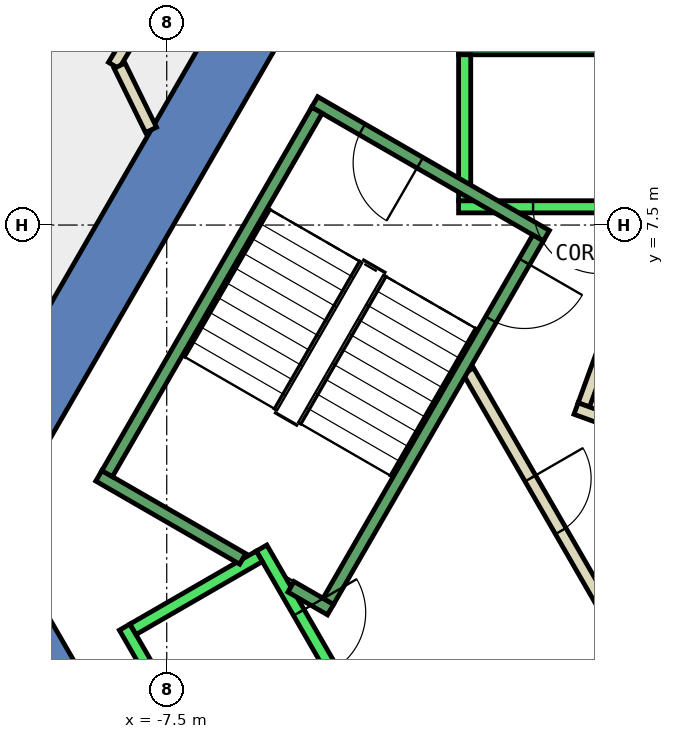
"""IFC4 building model, lengths in metres.
Left out: names, types, materials, properties, quantities, classifications, styles, units other than length and angle.
Written with IfcOpenShell. Run it as: python <this file> out.ifc"""

import sys

from ifc_helpers import new_model, si_unit, direction, frame, frame_2d, origin, place, context, subcontext, project, spatial, polyline, rectangle, outline, extrude, element, fill, save


model = new_model("IFC4")
c1 = context("Model", 3, precision=1e-05, world=origin(), true_north=direction((0.0, 1.0)))
c2 = subcontext(c1, "Body", "Model", "MODEL_VIEW")
j1 = project(units=[si_unit("LENGTHUNIT", "METRE"), si_unit("PLANEANGLEUNIT", "RADIAN")], contexts=[c1])
p1 = place(None, origin())
s1 = spatial("IfcSite", under=j1, at=p1, CompositionType="ELEMENT")
p2 = place(p1, origin())
s2 = spatial("IfcBuilding", under=s1, at=p2, CompositionType="ELEMENT")
p3 = place(p2, frame((0.0, 0.0, 273.8)))
s3 = spatial("IfcBuildingStorey", under=s2, at=p3, CompositionType="ELEMENT", Elevation=273.8)
p4 = place(p3, frame((0.0, 0.0, -0.34)))
e1 = element("IfcWall", 1, at=p4, inside=s3, PredefinedType="SHEAR", context=c2, shape_type="SweptSolid", body=[
    extrude(outline(polyline([(-10.535, 4.253), (-9.583, 3.703), (-5.138, 11.4), (-5.774, 12.5), (-10.535, 4.253)])), origin(), (0.0, 0.0, 1.0), 3.6),
])
p5 = place(p3, frame((0.0, 0.0, -0.34)))
e2 = element("IfcWall", 2, at=p5, inside=s3, PredefinedType="SHEAR", context=c2, shape_type="SweptSolid", body=[
    extrude(outline(polyline([(-11.547, 2.5), (-5.774, -7.5), (-5.138, -6.4), (-10.277, 2.5), (-11.547, 2.5)])), origin(), (0.0, 0.0, 1.0), 3.6),
])
p6 = place(p3, frame((0.181, 6.797, 0.0), z_axis=(0.0, 0.0, 1.0), x_axis=(-0.342020767299, -0.939692393678, 0.0)))
e3 = element("IfcWall", 3, at=p6, inside=s3, PredefinedType="PARTITIONING", context=c2, shape_type="SweptSolid", body=[
    extrude(rectangle(XDim=2.4, YDim=0.2, at=frame_2d((1.2, 0.0))), origin(), (0.0, 0.0, 1.0), 3.26),
])
p7 = place(p3, frame((-0.768, 4.482, 0.0), z_axis=(0.0, 0.0, 1.0), x_axis=(0.939664280748, -0.342097996905, 0.0)))
e4 = element("IfcWall", 4, at=p7, inside=s3, PredefinedType="PARTITIONING", context=c2, shape_type="SweptSolid", body=[
    extrude(rectangle(XDim=2.595, YDim=0.2, at=frame_2d((1.298, 0.0))), origin(), (0.0, 0.0, 1.0), 3.26),
])
p8 = place(p7, frame((0.848, 0.0, 0.0)))
e5 = element("IfcOpeningElement", 5, at=p8, cuts=e4, PredefinedType="OPENING", context=c2, shape_type="SweptSolid", body=[
    extrude(rectangle(XDim=0.9, YDim=2.1, at=frame_2d((0.45, 1.05))), frame((0.0, 0.11, 0.0), z_axis=(0.0, -1.0, 0.0), x_axis=(1.0, 0.0, 0.0)), (0.0, 0.0, 1.0), 0.22),
])
p9 = place(p3, frame((-5.885, 14.264, 0.0), z_axis=(0.0, 0.0, 1.0), x_axis=(-0.514971458129, -0.857207324579, 0.0)))
e6 = element("IfcWall", 6, at=p9, inside=s3, PredefinedType="PARTITIONING", context=c2, shape_type="SweptSolid", body=[
    extrude(rectangle(XDim=4.83, YDim=0.2, at=frame_2d((2.415, 0.0))), origin(), (0.0, 0.0, 1.0), 3.26),
])
p10 = place(p9, frame((1.915, 0.0, 0.0)))
e7 = element("IfcOpeningElement", 7, at=p10, cuts=e6, PredefinedType="OPENING", context=c2, shape_type="SweptSolid", body=[
    extrude(rectangle(XDim=1.0, YDim=2.1, at=frame_2d((0.5, 1.05))), frame((0.0, 0.11, 0.0), z_axis=(0.0, -1.0, 0.0), x_axis=(1.0, 0.0, 0.0)), (0.0, 0.0, 1.0), 0.22),
])
p11 = place(p3, frame((-8.276, 10.12, 0.0), z_axis=(0.0, 0.0, 1.0), x_axis=(0.440226122236, -0.897886942382, 0.0)))
e8 = element("IfcWall", 8, at=p11, inside=s3, PredefinedType="PARTITIONING", context=c2, shape_type="SweptSolid", body=[
    extrude(rectangle(XDim=1.176, YDim=0.2, at=frame_2d((0.588, 0.0))), origin(), (0.0, 0.0, 1.0), 3.26),
])
p12 = place(p3, frame((-10.789, 9.985, 0.0), z_axis=(0.0, 0.0, 1.0), x_axis=(0.51487988517, 0.857262330823, 0.0)))
e9 = element("IfcWall", 9, at=p12, inside=s3, PredefinedType="PARTITIONING", context=c2, shape_type="SweptSolid", body=[
    extrude(rectangle(XDim=3.177, YDim=0.2, at=frame_2d((1.589, 0.0))), origin(), (0.0, 0.0, 1.0), 3.26),
])
p13 = place(p12, frame((1.089, 0.0, 0.0)))
e10 = element("IfcOpeningElement", 10, at=p13, cuts=e9, PredefinedType="OPENING", context=c2, shape_type="SweptSolid", body=[
    extrude(rectangle(XDim=1.0, YDim=2.1, at=frame_2d((0.5, 1.05))), frame((0.0, 0.11, 0.0), z_axis=(0.0, -1.0, 0.0), x_axis=(1.0, 0.0, 0.0)), (0.0, 0.0, 1.0), 0.22),
])
p14 = place(p3, frame((-0.982, -1.0, 0.0), z_axis=(0.0, 0.0, 1.0), x_axis=(0.50024047865, 0.865886518847, 0.0)))
e11 = element("IfcWall", 11, at=p14, inside=s3, PredefinedType="PARTITIONING", context=c2, shape_type="SweptSolid", body=[
    extrude(rectangle(XDim=1.863, YDim=0.2, at=frame_2d((0.931, 0.0))), origin(), (0.0, 0.0, 1.0), 3.26),
])
p15 = place(p3, frame((-2.54, 5.1, 0.0), z_axis=(0.0, 0.0, 1.0), x_axis=(0.499925051871, -0.866068670783, 0.0)))
e12 = element("IfcWall", 12, at=p15, inside=s3, PredefinedType="PARTITIONING", context=c2, shape_type="SweptSolid", body=[
    extrude(rectangle(XDim=5.181, YDim=0.2, at=frame_2d((2.59, 0.0))), origin(), (0.0, 0.0, 1.0), 3.26),
])
p16 = place(p15, frame((2.04, 0.0, 0.0)))
e13 = element("IfcOpeningElement", 13, at=p16, cuts=e12, PredefinedType="OPENING", context=c2, shape_type="SweptSolid", body=[
    extrude(rectangle(XDim=1.0, YDim=2.1, at=frame_2d((0.5, 1.05))), frame((0.0, 0.11, 0.0), z_axis=(0.0, -1.0, 0.0), x_axis=(1.0, 0.0, 0.0)), (0.0, 0.0, 1.0), 0.22),
])
p17 = place(p3, frame((2.7, 7.8, 0.0), z_axis=(0.0, 0.0, 1.0), x_axis=(-1.0, 0.0, 0.0)))
e14 = element("IfcWall", 14, at=p17, inside=s3, PredefinedType="STANDARD", context=c2, shape_type="SweptSolid", body=[
    extrude(rectangle(XDim=5.4, YDim=0.2, at=frame_2d((2.7, 0.0))), origin(), (0.0, 0.0, 1.0), 3.26),
])
p18 = place(p17, frame((1.225, 0.0, 0.0)))
e15 = element("IfcOpeningElement", 15, at=p18, cuts=e14, PredefinedType="OPENING", context=c2, shape_type="SweptSolid", body=[
    extrude(rectangle(XDim=1.1, YDim=2.1, at=frame_2d((0.55, 1.05))), frame((0.0, 0.11, 0.0), z_axis=(0.0, -1.0, 0.0), x_axis=(1.0, 0.0, 0.0)), (0.0, 0.0, 1.0), 0.22),
])
p19 = place(p17, frame((3.075, 0.0, 0.0)))
e16 = element("IfcOpeningElement", 16, at=p19, cuts=e14, PredefinedType="OPENING", context=c2, shape_type="SweptSolid", body=[
    extrude(rectangle(XDim=1.1, YDim=2.1, at=frame_2d((0.55, 1.05))), frame((0.0, 0.11, 0.0), z_axis=(0.0, -1.0, 0.0), x_axis=(1.0, 0.0, 0.0)), (0.0, 0.0, 1.0), 0.22),
])
p20 = place(p3, frame((2.7, 10.4, 0.0), z_axis=(0.0, 0.0, 1.0), x_axis=(-1.0, 0.0, 0.0)))
e17 = element("IfcWall", 17, at=p20, inside=s3, PredefinedType="STANDARD", context=c2, shape_type="SweptSolid", body=[
    extrude(rectangle(XDim=5.4, YDim=0.2, at=frame_2d((2.7, 0.0))), origin(), (0.0, 0.0, 1.0), 3.26),
])
p21 = place(p3, frame((-2.6, 7.9, 0.0), z_axis=(0.0, 0.0, 1.0), x_axis=(0.0, 1.0, 0.0)))
e18 = element("IfcWall", 18, at=p21, inside=s3, PredefinedType="STANDARD", context=c2, shape_type="SweptSolid", body=[
    extrude(rectangle(XDim=2.4, YDim=0.2, at=frame_2d((1.2, 0.0))), origin(), (0.0, 0.0, 1.0), 3.26),
])
p22 = place(p3, frame((-5.94, 2.188, 0.0), z_axis=(0.0, 0.0, 1.0), x_axis=(0.500034260056, -0.866005622828, 0.0)))
e19 = element("IfcWall", 19, at=p22, inside=s3, PredefinedType="STANDARD", context=c2, shape_type="SweptSolid", body=[
    extrude(rectangle(XDim=5.399, YDim=0.2, at=frame_2d((2.7, 0.0))), origin(), (0.0, 0.0, 1.0), 3.26),
])
p23 = place(p22, frame((3.075, 0.0, 0.0)))
e20 = element("IfcOpeningElement", 20, at=p23, cuts=e19, PredefinedType="OPENING", context=c2, shape_type="SweptSolid", body=[
    extrude(rectangle(XDim=1.1, YDim=2.1, at=frame_2d((0.55, 1.05))), frame((0.0, 0.11, 0.0), z_axis=(0.0, -1.0, 0.0), x_axis=(1.0, 0.0, 0.0)), (0.0, 0.0, 1.0), 0.22),
])
p24 = place(p22, frame((1.225, 0.0, 0.0)))
e21 = element("IfcOpeningElement", 21, at=p24, cuts=e19, PredefinedType="OPENING", context=c2, shape_type="SweptSolid", body=[
    extrude(rectangle(XDim=1.1, YDim=2.1, at=frame_2d((0.55, 1.05))), frame((0.0, 0.11, 0.0), z_axis=(0.0, -1.0, 0.0), x_axis=(1.0, 0.0, 0.0)), (0.0, 0.0, 1.0), 0.22),
])
p25 = place(p3, frame((-8.192, 0.888, 0.0), z_axis=(0.0, 0.0, 1.0), x_axis=(0.500034260056, -0.866005622828, 0.0)))
e22 = element("IfcWall", 22, at=p25, inside=s3, PredefinedType="STANDARD", context=c2, shape_type="SweptSolid", body=[
    extrude(rectangle(XDim=5.399, YDim=0.2, at=frame_2d((2.7, 0.0))), origin(), (0.0, 0.0, 1.0), 3.26),
])
p26 = place(p3, frame((-5.977, 2.052, 0.0), z_axis=(0.0, 0.0, 1.0), x_axis=(-0.865973769406, -0.500089422704, 0.0)))
e23 = element("IfcWall", 23, at=p26, inside=s3, PredefinedType="STANDARD", context=c2, shape_type="SweptSolid", body=[
    extrude(rectangle(XDim=2.399, YDim=0.2, at=frame_2d((1.2, 0.0))), origin(), (0.0, 0.0, 1.0), 3.26),
])
p27 = place(p3, frame((-1.256, 7.324, 0.0), z_axis=(0.0, 0.0, 1.0), x_axis=(-0.866046073146, 0.499964197906, 0.0)))
e24 = element("IfcWall", 24, at=p27, inside=s3, PredefinedType="STANDARD", context=c2, shape_type="SweptSolid", body=[
    extrude(rectangle(XDim=4.4, YDim=0.2, at=frame_2d((2.2, 0.0))), origin(), (0.0, 0.0, 1.0), 3.26),
])
p28 = place(p27, frame((2.4, 0.0, 0.0)))
e25 = element("IfcOpeningElement", 25, at=p28, cuts=e24, PredefinedType="OPENING", context=c2, shape_type="SweptSolid", body=[
    extrude(rectangle(XDim=1.1, YDim=2.2, at=frame_2d((0.55, 1.1))), frame((0.0, 0.11, 0.0), z_axis=(0.0, -1.0, 0.0), x_axis=(1.0, 0.0, 0.0)), (0.0, 0.0, 1.0), 0.22),
])
p29 = place(p3, frame((-6.25, 2.01, 0.0), z_axis=(0.0, 0.0, 1.0), x_axis=(-0.86611865017, 0.499838457731, 0.0)))
e26 = element("IfcWall", 26, at=p29, inside=s3, PredefinedType="STANDARD", context=c2, shape_type="SweptSolid", body=[
    extrude(rectangle(XDim=2.733, YDim=0.2, at=frame_2d((1.366, 0.0))), origin(), (0.0, 0.0, 1.0), 3.26),
])
p30 = place(p3, frame((-4.806, 1.176, 0.0), z_axis=(0.0, 0.0, 1.0), x_axis=(-0.866558586415, 0.499075361355, 0.0)))
e27 = element("IfcWall", 27, at=p30, inside=s3, PredefinedType="STANDARD", context=c2, shape_type="SweptSolid", body=[
    extrude(rectangle(XDim=0.751, YDim=0.2, at=frame_2d((0.376, 0.0))), origin(), (0.0, 0.0, 1.0), 3.26),
])
p31 = place(p3, frame((-1.393, 7.288, 0.0), z_axis=(0.0, 0.0, 1.0), x_axis=(-0.499963383562, -0.866046543262, 0.0)))
e28 = element("IfcWall", 28, at=p31, inside=s3, PredefinedType="STANDARD", context=c2, shape_type="SweptSolid", body=[
    extrude(rectangle(XDim=6.9, YDim=0.2, at=frame_2d((3.45, 0.0))), origin(), (0.0, 0.0, 1.0), 3.26),
])
p32 = place(p31, frame((0.45, 0.0, 0.0)))
e29 = element("IfcOpeningElement", 29, at=p32, cuts=e28, PredefinedType="OPENING", context=c2, shape_type="SweptSolid", body=[
    extrude(rectangle(XDim=1.1, YDim=2.2, at=frame_2d((0.55, 1.1))), frame((0.0, 0.11, 0.0), z_axis=(0.0, -1.0, 0.0), x_axis=(1.0, 0.0, 0.0)), (0.0, 0.0, 1.0), 0.22),
])
p33 = place(p3, frame((-5.03, 9.388, 0.0), z_axis=(0.0, 0.0, 1.0), x_axis=(-0.499978703459, -0.866037698999, 0.0)))
e30 = element("IfcWall", 30, at=p33, inside=s3, PredefinedType="STANDARD", context=c2, shape_type="SweptSolid", body=[
    extrude(rectangle(XDim=6.9, YDim=0.2, at=frame_2d((3.45, 0.0))), origin(), (0.0, 0.0, 1.0), 3.26),
])
p34 = place(p16, origin())
e31 = element("IfcDoor", 31, at=p34, inside=s3, OperationType="SINGLE_SWING_LEFT", PredefinedType="DOOR", context=c2, shape_type="SweptSolid", body=[
    extrude(rectangle(XDim=1.0, YDim=2.1, at=frame_2d((0.5, 1.05))), frame((0.0, 0.025, 0.0), z_axis=(0.0, -1.0, 0.0), x_axis=(1.0, 0.0, 0.0)), (0.0, 0.0, 1.0), 0.05),
])
fill(e13, e31)
p35 = place(p19, origin())
e32 = element("IfcDoor", 32, at=p35, inside=s3, OperationType="SLIDING_TO_LEFT", PredefinedType="DOOR", context=c2, shape_type="SweptSolid", body=[
    extrude(rectangle(XDim=1.1, YDim=2.1, at=frame_2d((0.55, 1.05))), frame((0.0, 0.025, 0.0), z_axis=(0.0, -1.0, 0.0), x_axis=(1.0, 0.0, 0.0)), (0.0, 0.0, 1.0), 0.05),
])
fill(e16, e32)
p36 = place(p24, origin())
e33 = element("IfcDoor", 33, at=p36, inside=s3, OperationType="SLIDING_TO_LEFT", PredefinedType="DOOR", context=c2, shape_type="SweptSolid", body=[
    extrude(rectangle(XDim=1.1, YDim=2.1, at=frame_2d((0.55, 1.05))), frame((0.0, 0.025, 0.0), z_axis=(0.0, -1.0, 0.0), x_axis=(1.0, 0.0, 0.0)), (0.0, 0.0, 1.0), 0.05),
])
fill(e21, e33)
p37 = place(p32, origin())
e34 = element("IfcDoor", 34, at=p37, inside=s3, OperationType="SINGLE_SWING_LEFT", PredefinedType="DOOR", context=c2, shape_type="SweptSolid", body=[
    extrude(rectangle(XDim=1.1, YDim=2.2, at=frame_2d((0.55, 1.1))), frame((0.0, 0.025, 0.0), z_axis=(0.0, -1.0, 0.0), x_axis=(1.0, 0.0, 0.0)), (0.0, 0.0, 1.0), 0.05),
])
fill(e29, e34)
p38 = place(p28, origin())
e35 = element("IfcDoor", 35, at=p38, inside=s3, OperationType="SINGLE_SWING_LEFT", PredefinedType="DOOR", context=c2, shape_type="SweptSolid", body=[
    extrude(rectangle(XDim=1.1, YDim=2.2, at=frame_2d((0.55, 1.1))), frame((0.0, 0.025, 0.0), z_axis=(0.0, -1.0, 0.0), x_axis=(1.0, 0.0, 0.0)), (0.0, 0.0, 1.0), 0.05),
])
fill(e25, e35)
save(model, sys.argv[1])
